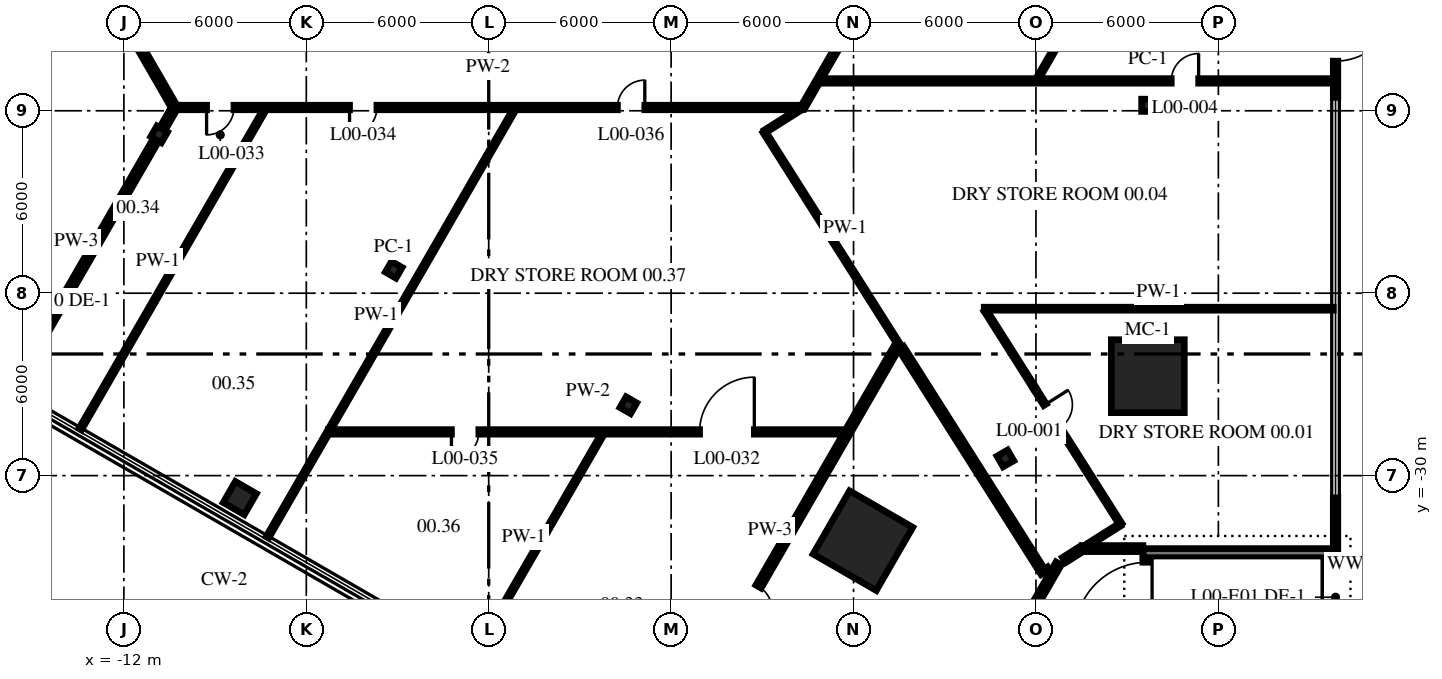
"""IFC4 building model, lengths in metres.
Left out: names, types, materials, properties, quantities, classifications, styles, units other than length and angle.
Written with IfcOpenShell. Run it as: python <this file> out.ifc"""

import sys

from ifc_helpers import new_model, si_unit, direction, frame, frame_2d, origin, origin_2d, place, context, subcontext, project, spatial, rectangle, i_section, extrude, source, transform, mapped, element, fill, save


model = new_model("IFC4")
c1 = context("Model", 3, precision=1e-05, world=origin(), true_north=direction((0.0, 1.0)))
c2 = subcontext(c1, "Body", "Model", "MODEL_VIEW")
j1 = project(units=[si_unit("LENGTHUNIT", "METRE"), si_unit("PLANEANGLEUNIT", "RADIAN")], contexts=[c1])
p1 = place(None, origin())
s1 = spatial("IfcSite", under=j1, at=p1, CompositionType="ELEMENT")
p2 = place(p1, origin())
s2 = spatial("IfcBuilding", under=s1, at=p2, CompositionType="ELEMENT")
p3 = place(p2, origin())
s3 = spatial("IfcBuildingStorey", under=s2, at=p3, CompositionType="ELEMENT", Elevation=0.0)
m1 = source(origin(), c2, "Body", "SweptSolid", [
    extrude(rectangle(XDim=2.4, YDim=2.4, at=origin_2d()), origin(), (0.0, 0.0, 1.0), 7.2),
])
p4 = place(p3, frame((21.679, -26.73, -0.2), z_axis=(0.0, 0.0, 1.0), x_axis=(0.0, 1.0, 0.0)))
e1 = element("IfcColumn", 1, at=p4, inside=s3, PredefinedType="COLUMN", context=c2, shape_type="MappedRepresentation", body=[
    mapped(m1, transform((0.0, 0.0, 0.0), scale=1.0)),
])
m2 = source(origin(), c2, "Body", "SweptSolid", [
    extrude(i_section(OverallWidth=0.404, OverallDepth=0.406, WebThickness=0.027, FlangeThickness=0.044, at=origin_2d()), origin(), (0.0, 0.0, 1.0), 7.2),
])
for number, where, z_axis, x_axis in (
    (2, (21.679, -17.82, -0.2), (0.0, 0.0, 1.0), (0.0, 1.0, 0.0)),
    (3, (-10.84, -18.775, -0.2), (0.0, 0.0, 1.0), (0.866, -0.5, 0.0)),
    (4, (-3.124, -23.23, -0.2), (0.0, 0.0, 1.0), (0.866, -0.5, 0.0)),
    (5, (4.593, -27.685, -0.2), (0.0, 0.0, 1.0), (0.866, -0.5, 0.0)),
):
    element("IfcColumn", number, at=place(p3, frame(where, z_axis=z_axis, x_axis=x_axis)), inside=s3, PredefinedType="COLUMN", context=c2, shape_type="MappedRepresentation", body=[
        mapped(m2, transform((0.0, 0.0, 0.0), scale=1.0)),
    ])
p5 = place(p3, frame((12.309, -32.14, -0.2), z_axis=(0.0, 0.0, 1.0), x_axis=(0.866025403784, -0.5, 0.0)))
e6 = element("IfcColumn", 6, at=p5, inside=s3, PredefinedType="COLUMN", context=c2, shape_type="MappedRepresentation", body=[
    mapped(m1, transform((0.0, 0.0, 0.0), scale=1.0)),
])
p6 = place(p3, frame((16.994, -29.435, -0.2), z_axis=(0.0, 0.0, 1.0), x_axis=(0.866026276448, 0.4999984885, 0.0)))
e7 = element("IfcColumn", 7, at=p6, inside=s3, PredefinedType="COLUMN", context=c2, shape_type="MappedRepresentation", body=[
    mapped(m2, transform((0.0, 0.0, 0.0), scale=1.0)),
])
m3 = source(origin(), c2, "Body", "SweptSolid", [
    extrude(rectangle(XDim=0.8, YDim=0.8, at=origin_2d()), origin(), (0.0, 0.0, 1.0), 7.2),
])
p7 = place(p3, frame((-8.187, -30.74, -0.2), z_axis=(0.0, 0.0, 1.0), x_axis=(0.866025403784, -0.5, 0.0)))
e8 = element("IfcColumn", 8, at=p7, inside=s3, PredefinedType="COLUMN", context=c2, shape_type="MappedRepresentation", body=[
    mapped(m3, transform((0.0, 0.0, 0.0), scale=1.0)),
])
m4 = source(origin(), c2, "Body", "SweptSolid", [
    extrude(rectangle(XDim=10.3, YDim=0.3, at=frame_2d((5.15, 0.0))), origin(), (0.0, 0.0, 1.0), 6.8),
])
p8 = place(p3, frame((21.67, -43.0, 0.0), z_axis=(0.0, 0.0, 1.0), x_axis=(0.0, 1.0, 0.0)))
e9 = element("IfcWall", 9, at=p8, inside=s3, PredefinedType="SHEAR", context=c2, shape_type="MappedRepresentation", body=[
    mapped(m4, transform((0.0, 0.0, 0.0), scale=1.0)),
])
p9 = place(p8, frame((7.75, 0.0, 0.0)))
e10 = element("IfcOpeningElement", 10, at=p9, cuts=e9, PredefinedType="OPENING", context=c2, shape_type="SweptSolid", body=[
    extrude(rectangle(XDim=2.4, YDim=2.1, at=frame_2d((1.2, 1.05))), frame((0.0, 0.16, 0.0), z_axis=(0.0, -1.0, 0.0), x_axis=(1.0, 0.0, 0.0)), (0.0, 0.0, 1.0), 0.32),
])
m5 = source(origin(), c2, "Body", "SweptSolid", [
    extrude(rectangle(XDim=6.26, YDim=0.3, at=frame_2d((3.13, 0.0))), origin(), (0.0, 0.0, 1.0), 6.8),
])
p10 = place(p3, frame((21.52, -32.55, 0.0), z_axis=(0.0, 0.0, 1.0), x_axis=(1.0, 0.0, 0.0)))
e11 = element("IfcWall", 11, at=p10, inside=s3, PredefinedType="SHEAR", context=c2, shape_type="MappedRepresentation", body=[
    mapped(m5, transform((0.0, 0.0, 0.0), scale=1.0)),
])
m6 = source(origin(), c2, "Body", "SweptSolid", [
    extrude(rectangle(XDim=4.391, YDim=0.15, at=frame_2d((2.195, 0.0))), origin(), (0.0, 0.0, 1.0), 6.8),
])
p11 = place(p3, frame((27.854, -30.734, 0.0), z_axis=(0.0, 0.0, 1.0), x_axis=(0.0, -1.0, 0.0)))
e12 = element("IfcWall", 12, at=p11, inside=s3, PredefinedType="ELEMENTEDWALL", context=c2, shape_type="MappedRepresentation", body=[
    mapped(m6, transform((0.0, 0.0, 0.0), scale=1.0)),
])
p12 = place(p11, frame((2.266, 0.0, 0.0)))
e13 = element("IfcOpeningElement", 13, at=p12, cuts=e12, PredefinedType="OPENING", context=c2, shape_type="SweptSolid", body=[
    extrude(rectangle(XDim=2.0, YDim=2.7, at=frame_2d((1.0, 1.35))), frame((0.0, 0.085, 0.0), z_axis=(0.0, -1.0, 0.0), x_axis=(1.0, 0.0, 0.0)), (0.0, 0.0, 1.0), 0.17),
])
m7 = source(origin(), c2, "Body", "SweptSolid", [
    extrude(rectangle(XDim=4.39, YDim=0.15, at=frame_2d((2.195, 0.0))), origin(), (0.0, 0.0, 1.0), 6.8),
])
p13 = place(p3, frame((27.854, -13.172, 0.0), z_axis=(0.0, 0.0, 1.0), x_axis=(0.0, -1.0, 0.0)))
e14 = element("IfcWall", 14, at=p13, inside=s3, PredefinedType="ELEMENTEDWALL", context=c2, shape_type="MappedRepresentation", body=[
    mapped(m7, transform((0.0, 0.0, 0.0), scale=1.0)),
])
p14 = place(p13, frame((1.195, 0.0, 0.0)))
e15 = element("IfcOpeningElement", 15, at=p14, cuts=e14, PredefinedType="OPENING", context=c2, shape_type="SweptSolid", body=[
    extrude(rectangle(XDim=2.0, YDim=2.7, at=frame_2d((1.0, 1.35))), frame((0.0, 0.085, 0.0), z_axis=(0.0, -1.0, 0.0), x_axis=(1.0, 0.0, 0.0)), (0.0, 0.0, 1.0), 0.17),
])
p15 = place(p3, frame((-14.969, -9.858, 0.0), z_axis=(0.0, 0.0, 1.0), x_axis=(0.500003393015, -0.866023444818, 0.0)))
e16 = element("IfcWall", 16, at=p15, inside=s3, PredefinedType="PARTITIONING", context=c2, shape_type="SweptSolid", body=[
    extrude(rectangle(XDim=9.228, YDim=0.2, at=frame_2d((4.614, 0.0))), origin(), (0.0, 0.0, 1.0), 6.8),
])
p16 = place(p15, frame((4.094, 0.0, 0.0)))
e17 = element("IfcOpeningElement", 17, at=p16, cuts=e16, PredefinedType="OPENING", context=c2, shape_type="SweptSolid", body=[
    extrude(rectangle(XDim=0.9, YDim=2.1, at=frame_2d((0.45, 1.05))), frame((0.0, 0.11, 0.0), z_axis=(0.0, -1.0, 0.0), x_axis=(1.0, 0.0, 0.0)), (0.0, 0.0, 1.0), 0.22),
])
p17 = place(p3, frame((9.063, -18.695, 0.0), z_axis=(0.0, 0.0, 1.0), x_axis=(0.53511294812, -0.844780523423, 0.0)))
e18 = element("IfcWall", 18, at=p17, inside=s3, PredefinedType="PARTITIONING", context=c2, shape_type="SweptSolid", body=[
    extrude(rectangle(XDim=8.206, YDim=0.1, at=frame_2d((4.103, 0.0))), origin(), (0.0, 0.0, 1.0), 6.8),
])
p18 = place(p3, frame((13.562, -25.797, 0.0), z_axis=(0.0, 0.0, 1.0), x_axis=(0.535108395304, -0.844783407315, 0.0)))
e19 = element("IfcWall", 19, at=p18, inside=s3, PredefinedType="PARTITIONING", context=c2, shape_type="SweptSolid", body=[
    extrude(rectangle(XDim=8.767, YDim=0.2, at=frame_2d((4.383, 0.0))), origin(), (0.0, 0.0, 1.0), 6.8),
])
p19 = place(p3, frame((16.335, -24.569, 0.0), z_axis=(0.0, 0.0, 1.0), x_axis=(0.535176544108, -0.844740236189, 0.0)))
e20 = element("IfcWall", 20, at=p19, inside=s3, PredefinedType="PARTITIONING", context=c2, shape_type="SweptSolid", body=[
    extrude(rectangle(XDim=3.033, YDim=0.1, at=frame_2d((1.517, 0.0))), origin(), (0.0, 0.0, 1.0), 6.043),
])
p20 = place(p3, frame((17.958, -27.131, 0.0), z_axis=(0.0, 0.0, 1.0), x_axis=(0.535066364246, -0.844810029446, 0.0)))
e21 = element("IfcWall", 21, at=p20, inside=s3, PredefinedType="PARTITIONING", context=c2, shape_type="SweptSolid", body=[
    extrude(rectangle(XDim=5.286, YDim=0.1, at=frame_2d((2.643, 0.0))), origin(), (0.0, 0.0, 1.0), 6.8),
])
p21 = place(p20, frame((0.636, 0.0, 0.0)))
e22 = element("IfcOpeningElement", 22, at=p21, cuts=e21, PredefinedType="OPENING", context=c2, shape_type="SweptSolid", body=[
    extrude(rectangle(XDim=0.9, YDim=2.1, at=frame_2d((0.45, 1.05))), frame((0.0, 0.06, 0.0), z_axis=(0.0, -1.0, 0.0), x_axis=(1.0, 0.0, 0.0)), (0.0, 0.0, 1.0), 0.12),
])
m8 = source(origin(), c2, "Body", "SweptSolid", [
    extrude(rectangle(XDim=2.0, YDim=0.2, at=frame_2d((1.0, 0.0))), origin(), (0.0, 0.0, 1.0), 6.8),
])
p22 = place(p3, frame((19.52, -32.4, 0.0), z_axis=(0.0, 0.0, 1.0), x_axis=(1.0, 0.0, 0.0)))
e23 = element("IfcWall", 23, at=p22, inside=s3, PredefinedType="PARTITIONING", context=c2, shape_type="MappedRepresentation", body=[
    mapped(m8, transform((0.0, 0.0, 0.0), scale=1.0)),
])
p23 = place(p3, frame((-5.276, -28.562, 0.0), z_axis=(0.0, 0.0, 1.0), x_axis=(1.0, 0.0, 0.0)))
e24 = element("IfcWall", 24, at=p23, inside=s3, PredefinedType="PARTITIONING", context=c2, shape_type="SweptSolid", body=[
    extrude(rectangle(XDim=17.087, YDim=0.15, at=frame_2d((8.544, 0.0))), origin(), (0.0, 0.0, 1.0), 6.8),
])
p24 = place(p23, frame((12.212, 0.0, 0.0)))
e25 = element("IfcOpeningElement", 25, at=p24, cuts=e24, PredefinedType="OPENING", context=c2, shape_type="SweptSolid", body=[
    extrude(rectangle(XDim=1.8, YDim=2.4, at=frame_2d((0.9, 1.2))), frame((0.0, 0.085, 0.0), z_axis=(0.0, -1.0, 0.0), x_axis=(1.0, 0.0, 0.0)), (0.0, 0.0, 1.0), 0.17),
])
p25 = place(p23, frame((4.05, 0.0, 0.0)))
e26 = element("IfcOpeningElement", 26, at=p25, cuts=e24, PredefinedType="OPENING", context=c2, shape_type="SweptSolid", body=[
    extrude(rectangle(XDim=0.9, YDim=2.1, at=frame_2d((0.45, 1.05))), frame((0.0, 0.085, 0.0), z_axis=(0.0, -1.0, 0.0), x_axis=(1.0, 0.0, 0.0)), (0.0, 0.0, 1.0), 0.17),
])
p26 = place(p3, frame((16.298, -24.51, 0.0), z_axis=(0.0, 0.0, 1.0), x_axis=(1.0, 0.0, 0.0)))
e27 = element("IfcWall", 27, at=p26, inside=s3, PredefinedType="PARTITIONING", context=c2, shape_type="SweptSolid", body=[
    extrude(rectangle(XDim=11.481, YDim=0.1, at=frame_2d((5.741, 0.0))), origin(), (0.0, 0.0, 1.0), 6.8),
])
p27 = place(p3, frame((-10.33, -17.892, 0.0), z_axis=(0.0, 0.0, 1.0), x_axis=(1.0, 0.0, 0.0)))
e28 = element("IfcWall", 28, at=p27, inside=s3, PredefinedType="PARTITIONING", context=c2, shape_type="SweptSolid", body=[
    extrude(rectangle(XDim=20.618, YDim=0.15, at=frame_2d((10.309, 0.0))), origin(), (0.0, 0.0, 1.0), 6.8),
])
p28 = place(p27, frame((1.05, 0.0, 0.0)))
e29 = element("IfcOpeningElement", 29, at=p28, cuts=e28, PredefinedType="OPENING", context=c2, shape_type="SweptSolid", body=[
    extrude(rectangle(XDim=0.9, YDim=2.1, at=frame_2d((0.45, 1.05))), frame((0.0, 0.085, 0.0), z_axis=(0.0, -1.0, 0.0), x_axis=(1.0, 0.0, 0.0)), (0.0, 0.0, 1.0), 0.17),
])
p29 = place(p27, frame((5.752, 0.0, 0.0)))
e30 = element("IfcOpeningElement", 30, at=p29, cuts=e28, PredefinedType="OPENING", context=c2, shape_type="SweptSolid", body=[
    extrude(rectangle(XDim=0.9, YDim=2.1, at=frame_2d((0.45, 1.05))), frame((0.0, 0.085, 0.0), z_axis=(0.0, -1.0, 0.0), x_axis=(1.0, 0.0, 0.0)), (0.0, 0.0, 1.0), 0.17),
])
p30 = place(p27, frame((14.564, 0.0, 0.0)))
e31 = element("IfcOpeningElement", 31, at=p30, cuts=e28, PredefinedType="OPENING", context=c2, shape_type="SweptSolid", body=[
    extrude(rectangle(XDim=0.9, YDim=2.1, at=frame_2d((0.45, 1.05))), frame((0.0, 0.085, 0.0), z_axis=(0.0, -1.0, 0.0), x_axis=(1.0, 0.0, 0.0)), (0.0, 0.0, 1.0), 0.17),
])
p31 = place(p3, frame((10.945, -17.018, 0.0), z_axis=(0.0, 0.0, 1.0), x_axis=(1.0, 0.0, 0.0)))
e32 = element("IfcWall", 32, at=p31, inside=s3, PredefinedType="PARTITIONING", context=c2, shape_type="SweptSolid", body=[
    extrude(rectangle(XDim=16.834, YDim=0.15, at=frame_2d((8.417, 0.0))), origin(), (0.0, 0.0, 1.0), 6.8),
])
p32 = place(p31, frame((11.506, 0.0, 0.0)))
e33 = element("IfcOpeningElement", 33, at=p32, cuts=e32, PredefinedType="OPENING", context=c2, shape_type="SweptSolid", body=[
    extrude(rectangle(XDim=0.9, YDim=2.1, at=frame_2d((0.45, 1.05))), frame((0.0, 0.085, 0.0), z_axis=(0.0, -1.0, 0.0), x_axis=(1.0, 0.0, 0.0)), (0.0, 0.0, 1.0), 0.17),
])
p33 = place(p3, frame((18.321, -33.16, 0.0), z_axis=(0.0, 0.0, 1.0), x_axis=(0.844314084278, 0.535848604636, 0.0)))
e34 = element("IfcWall", 34, at=p33, inside=s3, PredefinedType="PARTITIONING", context=c2, shape_type="SweptSolid", body=[
    extrude(rectangle(XDim=0.138, YDim=0.2, at=frame_2d((0.069, 0.0))), origin(), (0.0, 0.0, 1.0), 6.8),
])
p34 = place(p3, frame((18.923, -32.778, 0.0), z_axis=(0.0, 0.0, 1.0), x_axis=(0.844835415955, 0.53502627968, 0.0)))
e35 = element("IfcWall", 35, at=p34, inside=s3, PredefinedType="PARTITIONING", context=c2, shape_type="SweptSolid", body=[
    extrude(rectangle(XDim=0.675, YDim=0.2, at=frame_2d((0.338, 0.0))), origin(), (0.0, 0.0, 1.0), 6.8),
])
p35 = place(p3, frame((19.715, -32.277, 0.0), z_axis=(0.0, 0.0, 1.0), x_axis=(0.844730057631, 0.53519260994, 0.0)))
e36 = element("IfcWall", 36, at=p35, inside=s3, PredefinedType="PARTITIONING", context=c2, shape_type="SweptSolid", body=[
    extrude(rectangle(XDim=1.24, YDim=0.1, at=frame_2d((0.62, 0.0))), origin(), (0.0, 0.0, 1.0), 6.8),
])
p36 = place(p3, frame((9.088, -18.679, 0.0), z_axis=(0.0, 0.0, 1.0), x_axis=(0.844696427881, 0.53524568632, 0.0)))
e37 = element("IfcWall", 37, at=p36, inside=s3, PredefinedType="PARTITIONING", context=c2, shape_type="SweptSolid", body=[
    extrude(rectangle(XDim=1.29, YDim=0.1, at=frame_2d((0.645, 0.0))), origin(), (0.0, 0.0, 1.0), 6.8),
])
p37 = place(p3, frame((12.612, -43.515, 0.0), z_axis=(0.0, 0.0, 1.0), x_axis=(0.500002073493, 0.866024206649, 0.0)))
e38 = element("IfcWall", 38, at=p37, inside=s3, PredefinedType="PARTITIONING", context=c2, shape_type="SweptSolid", body=[
    extrude(rectangle(XDim=12.269, YDim=0.2, at=frame_2d((6.135, 0.0))), origin(), (0.0, 0.0, 1.0), 6.8),
])
p38 = place(p37, frame((5.675, 0.0, 0.0)))
e39 = element("IfcOpeningElement", 39, at=p38, cuts=e38, PredefinedType="OPENING", context=c2, shape_type="SweptSolid", body=[
    extrude(rectangle(XDim=0.9, YDim=2.1, at=frame_2d((0.45, 1.05))), frame((0.0, 0.11, 0.0), z_axis=(0.0, -1.0, 0.0), x_axis=(1.0, 0.0, 0.0)), (0.0, 0.0, 1.0), 0.22),
])
p39 = place(p3, frame((6.064, -38.517, 0.0), z_axis=(0.0, 0.0, 1.0), x_axis=(0.500001194597, 0.866024714083, 0.0)))
e40 = element("IfcWall", 40, at=p39, inside=s3, PredefinedType="PARTITIONING", context=c2, shape_type="SweptSolid", body=[
    extrude(rectangle(XDim=14.835, YDim=0.2, at=frame_2d((7.417, 0.0))), origin(), (0.0, 0.0, 1.0), 6.8),
])
p40 = place(p39, frame((4.721, 0.0, 0.0)))
e41 = element("IfcOpeningElement", 41, at=p40, cuts=e40, PredefinedType="OPENING", context=c2, shape_type="SweptSolid", body=[
    extrude(rectangle(XDim=0.9, YDim=2.1, at=frame_2d((0.45, 1.05))), frame((0.0, 0.11, 0.0), z_axis=(0.0, -1.0, 0.0), x_axis=(1.0, 0.0, 0.0)), (0.0, 0.0, 1.0), 0.22),
])
p41 = place(p3, frame((18.011, -17.018, 0.0), z_axis=(0.0, 0.0, 1.0), x_axis=(0.500016672517, 0.866015777688, 0.0)))
e42 = element("IfcWall", 42, at=p41, inside=s3, PredefinedType="PARTITIONING", context=c2, shape_type="SweptSolid", body=[
    extrude(rectangle(XDim=15.73, YDim=0.1, at=frame_2d((7.865, 0.0))), origin(), (0.0, 0.0, 1.0), 6.8),
])
p42 = place(p41, frame((9.45, 0.0, 0.0)))
e43 = element("IfcOpeningElement", 43, at=p42, cuts=e42, PredefinedType="OPENING", context=c2, shape_type="SweptSolid", body=[
    extrude(rectangle(XDim=1.8, YDim=2.4, at=frame_2d((0.9, 1.2))), frame((0.0, 0.06, 0.0), z_axis=(0.0, -1.0, 0.0), x_axis=(1.0, 0.0, 0.0)), (0.0, 0.0, 1.0), 0.12),
])
p43 = place(p3, frame((10.331, -17.891, 0.0), z_axis=(0.0, 0.0, 1.0), x_axis=(0.499988868439, 0.866031830499, 0.0)))
e44 = element("IfcWall", 44, at=p43, inside=s3, PredefinedType="PARTITIONING", context=c2, shape_type="SweptSolid", body=[
    extrude(rectangle(XDim=16.738, YDim=0.15, at=frame_2d((8.369, 0.0))), origin(), (0.0, 0.0, 1.0), 6.8),
])
p44 = place(p43, frame((6.041, 0.0, 0.0)))
e45 = element("IfcOpeningElement", 45, at=p44, cuts=e44, PredefinedType="OPENING", context=c2, shape_type="SweptSolid", body=[
    extrude(rectangle(XDim=0.9, YDim=2.1, at=frame_2d((0.45, 1.05))), frame((0.0, 0.085, 0.0), z_axis=(0.0, -1.0, 0.0), x_axis=(1.0, 0.0, 0.0)), (0.0, 0.0, 1.0), 0.17),
])
p45 = place(p3, frame((-0.482, -35.955, 0.0), z_axis=(0.0, 0.0, 1.0), x_axis=(0.500018509623, 0.866014716985, 0.0)))
e46 = element("IfcWall", 46, at=p45, inside=s3, PredefinedType="PARTITIONING", context=c2, shape_type="SweptSolid", body=[
    extrude(rectangle(XDim=8.447, YDim=0.1, at=frame_2d((4.224, 0.0))), origin(), (0.0, 0.0, 1.0), 6.8),
])
p46 = place(p3, frame((-7.279, -32.031, 0.0), z_axis=(0.0, 0.0, 1.0), x_axis=(0.499989721496, 0.866031338, 0.0)))
e47 = element("IfcWall", 47, at=p46, inside=s3, PredefinedType="PARTITIONING", context=c2, shape_type="SweptSolid", body=[
    extrude(rectangle(XDim=16.236, YDim=0.1, at=frame_2d((8.118, 0.0))), origin(), (0.0, 0.0, 1.0), 6.8),
])
p47 = place(p3, frame((-13.438, -28.475, 0.0), z_axis=(0.0, 0.0, 1.0), x_axis=(0.50000294753, 0.86602370202, 0.0)))
e48 = element("IfcWall", 48, at=p47, inside=s3, PredefinedType="PARTITIONING", context=c2, shape_type="SweptSolid", body=[
    extrude(rectangle(XDim=12.13, YDim=0.1, at=frame_2d((6.065, 0.0))), origin(), (0.0, 0.0, 1.0), 6.8),
])
p48 = place(p3, frame((-15.162, -26.263, 0.0), z_axis=(0.0, 0.0, 1.0), x_axis=(0.499984984754, 0.866034072667, 0.0)))
e49 = element("IfcWall", 49, at=p48, inside=s3, PredefinedType="PARTITIONING", context=c2, shape_type="SweptSolid", body=[
    extrude(rectangle(XDim=8.452, YDim=0.2, at=frame_2d((4.226, 0.0))), origin(), (0.0, 0.0, 1.0), 6.028),
])
p49 = place(p3, frame((-10.743, -18.608, 0.0), z_axis=(0.0, 0.0, 1.0), x_axis=(0.500080938595, 0.865978668822, 0.0)))
e50 = element("IfcWall", 50, at=p49, inside=s3, PredefinedType="PARTITIONING", context=c2, shape_type="SweptSolid", body=[
    extrude(rectangle(XDim=0.786, YDim=0.2, at=frame_2d((0.393, 0.0))), origin(), (0.0, 0.0, 1.0), 6.188),
])
p50 = place(p9, origin())
e51 = element("IfcDoor", 51, at=p50, inside=s3, OperationType="DOUBLE_DOOR_DOUBLE_SWING", PredefinedType="DOOR", context=c2, shape_type="SweptSolid", body=[
    extrude(rectangle(XDim=2.4, YDim=2.1, at=frame_2d((1.2, 1.05))), frame((0.0, 0.025, 0.0), z_axis=(0.0, -1.0, 0.0), x_axis=(1.0, 0.0, 0.0)), (0.0, 0.0, 1.0), 0.05),
])
fill(e10, e51)
p51 = place(p12, origin())
e52 = element("IfcDoor", 52, at=p51, inside=s3, OperationType="DOUBLE_DOOR_SINGLE_SWING", PredefinedType="DOOR", context=c2, shape_type="SweptSolid", body=[
    extrude(rectangle(XDim=2.0, YDim=2.7, at=frame_2d((1.0, 1.35))), frame((0.0, 0.025, 0.0), z_axis=(0.0, -1.0, 0.0), x_axis=(1.0, 0.0, 0.0)), (0.0, 0.0, 1.0), 0.05),
])
fill(e13, e52)
p52 = place(p14, origin())
e53 = element("IfcDoor", 53, at=p52, inside=s3, OperationType="DOUBLE_DOOR_SINGLE_SWING", PredefinedType="DOOR", context=c2, shape_type="SweptSolid", body=[
    extrude(rectangle(XDim=2.0, YDim=2.7, at=frame_2d((1.0, 1.35))), frame((0.0, 0.025, 0.0), z_axis=(0.0, -1.0, 0.0), x_axis=(1.0, 0.0, 0.0)), (0.0, 0.0, 1.0), 0.05),
])
fill(e15, e53)
p53 = place(p21, origin())
e54 = element("IfcDoor", 54, at=p53, inside=s3, OperationType="SINGLE_SWING_LEFT", PredefinedType="DOOR", context=c2, shape_type="SweptSolid", body=[
    extrude(rectangle(XDim=0.9, YDim=2.1, at=frame_2d((0.45, 1.05))), frame((0.0, 0.025, 0.0), z_axis=(0.0, -1.0, 0.0), x_axis=(1.0, 0.0, 0.0)), (0.0, 0.0, 1.0), 0.05),
])
fill(e22, e54)
p54 = place(p32, origin())
e55 = element("IfcDoor", 55, at=p54, inside=s3, OperationType="SINGLE_SWING_LEFT", PredefinedType="DOOR", context=c2, shape_type="SweptSolid", body=[
    extrude(rectangle(XDim=0.9, YDim=2.1, at=frame_2d((0.45, 1.05))), frame((0.0, 0.025, 0.0), z_axis=(0.0, -1.0, 0.0), x_axis=(1.0, 0.0, 0.0)), (0.0, 0.0, 1.0), 0.05),
])
fill(e33, e55)
p55 = place(p24, origin())
e56 = element("IfcDoor", 56, at=p55, inside=s3, OperationType="DOUBLE_DOOR_SINGLE_SWING", PredefinedType="DOOR", context=c2, shape_type="SweptSolid", body=[
    extrude(rectangle(XDim=1.8, YDim=2.4, at=frame_2d((0.9, 1.2))), frame((0.0, 0.025, 0.0), z_axis=(0.0, -1.0, 0.0), x_axis=(1.0, 0.0, 0.0)), (0.0, 0.0, 1.0), 0.05),
])
fill(e25, e56)
p56 = place(p28, origin())
e57 = element("IfcDoor", 57, at=p56, inside=s3, OperationType="SINGLE_SWING_RIGHT", PredefinedType="DOOR", context=c2, shape_type="SweptSolid", body=[
    extrude(rectangle(XDim=0.9, YDim=2.1, at=frame_2d((0.45, 1.05))), frame((0.0, 0.025, 0.0), z_axis=(0.0, -1.0, 0.0), x_axis=(1.0, 0.0, 0.0)), (0.0, 0.0, 1.0), 0.05),
])
fill(e29, e57)
p57 = place(p29, origin())
e58 = element("IfcDoor", 58, at=p57, inside=s3, OperationType="SINGLE_SWING_RIGHT", PredefinedType="DOOR", context=c2, shape_type="SweptSolid", body=[
    extrude(rectangle(XDim=0.9, YDim=2.1, at=frame_2d((0.45, 1.05))), frame((0.0, 0.025, 0.0), z_axis=(0.0, -1.0, 0.0), x_axis=(1.0, 0.0, 0.0)), (0.0, 0.0, 1.0), 0.05),
])
fill(e30, e58)
p58 = place(p25, origin())
e59 = element("IfcDoor", 59, at=p58, inside=s3, OperationType="SINGLE_SWING_RIGHT", PredefinedType="DOOR", context=c2, shape_type="SweptSolid", body=[
    extrude(rectangle(XDim=0.9, YDim=2.1, at=frame_2d((0.45, 1.05))), frame((0.0, 0.025, 0.0), z_axis=(0.0, -1.0, 0.0), x_axis=(1.0, 0.0, 0.0)), (0.0, 0.0, 1.0), 0.05),
])
fill(e26, e59)
p59 = place(p30, origin())
e60 = element("IfcDoor", 60, at=p59, inside=s3, OperationType="SINGLE_SWING_LEFT", PredefinedType="DOOR", context=c2, shape_type="SweptSolid", body=[
    extrude(rectangle(XDim=0.9, YDim=2.1, at=frame_2d((0.45, 1.05))), frame((0.0, 0.025, 0.0), z_axis=(0.0, -1.0, 0.0), x_axis=(1.0, 0.0, 0.0)), (0.0, 0.0, 1.0), 0.05),
])
fill(e31, e60)
p60 = place(p40, origin())
e61 = element("IfcDoor", 61, at=p60, inside=s3, OperationType="SINGLE_SWING_RIGHT", PredefinedType="DOOR", context=c2, shape_type="SweptSolid", body=[
    extrude(rectangle(XDim=0.9, YDim=2.1, at=frame_2d((0.45, 1.05))), frame((0.0, 0.025, 0.0), z_axis=(0.0, -1.0, 0.0), x_axis=(1.0, 0.0, 0.0)), (0.0, 0.0, 1.0), 0.05),
])
fill(e41, e61)
save(model, sys.argv[1])
